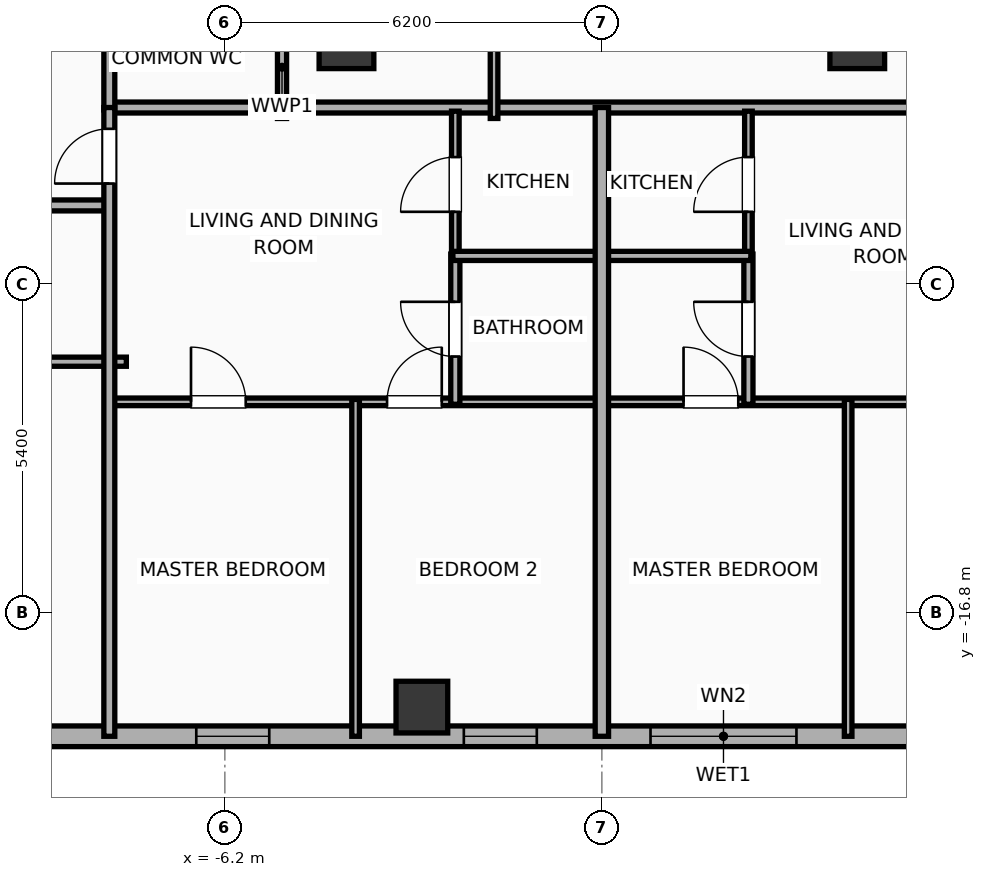
"""IFC4 building model, lengths in metres.
Left out: names, types, materials, properties, quantities, classifications, styles, units other than length and angle.
Written with IfcOpenShell. Run it as: python <this file> out.ifc"""

import sys

from ifc_helpers import new_model, si_unit, direction, frame, frame_2d, origin, origin_2d, place, context, subcontext, project, spatial, rectangle, hollow_rectangle, extrude, element, fill, save


model = new_model("IFC4")
c1 = context("Model", 3, precision=1e-05, world=origin(), true_north=direction((0.0, 1.0)))
c2 = subcontext(c1, "Body", "Model", "MODEL_VIEW")
j1 = project(units=[si_unit("LENGTHUNIT", "METRE"), si_unit("PLANEANGLEUNIT", "RADIAN")], contexts=[c1])
p1 = place(None, origin())
s1 = spatial("IfcSite", under=j1, at=p1, CompositionType="ELEMENT")
p2 = place(p1, origin())
s2 = spatial("IfcBuilding", under=s1, at=p2, CompositionType="ELEMENT")
p3 = place(p2, frame((0.0, 0.0, 235.3)))
s3 = spatial("IfcBuildingStorey", under=s2, at=p3, CompositionType="ELEMENT", Elevation=235.3)
for number, where, z_axis, x_axis in (
    (1, (-4.2, -7.4, 0.0), (0.0, 0.0, 1.0), (1.0, 0.0, 0.0)),
    (2, (4.2, -7.4, 0.0), (0.0, 0.0, 1.0), (1.0, 0.0, 0.0)),
):
    element("IfcColumn", number, at=place(p3, frame(where, z_axis=z_axis, x_axis=x_axis)), inside=s3, PredefinedType="COLUMN", context=c2, shape_type="SweptSolid", body=[
        extrude(rectangle(XDim=0.9, YDim=0.9, at=origin_2d()), origin(), (0.0, 0.0, 1.0), 3.9),
    ])
p4 = place(p3, frame((-2.96, -18.35, 0.0), z_axis=(0.0, 0.0, 1.0), x_axis=(1.0, 0.0, 0.0)))
e3 = element("IfcColumn", 3, at=p4, inside=s3, PredefinedType="COLUMN", context=c2, shape_type="SweptSolid", body=[
    extrude(hollow_rectangle(XDim=0.85, YDim=0.85, WallThickness=0.028, at=origin_2d()), origin(), (0.0, 0.0, 1.0), 3.9),
])
p5 = place(p3, frame((26.783, -18.83, 0.0), z_axis=(0.0, 0.0, 1.0), x_axis=(-1.0, 0.0, 0.0)))
e4 = element("IfcWall", 4, at=p5, inside=s3, PredefinedType="ELEMENTEDWALL", context=c2, shape_type="SweptSolid", body=[
    extrude(rectangle(XDim=49.566, YDim=0.34, at=frame_2d((24.783, 0.0))), origin(), (0.0, 0.0, 1.0), 3.65),
])
p6 = place(p5, frame((23.583, 0.0, 0.75)))
e5 = element("IfcOpeningElement", 5, at=p6, cuts=e4, PredefinedType="OPENING", context=c2, shape_type="SweptSolid", body=[
    extrude(rectangle(XDim=2.4, YDim=2.1, at=frame_2d((1.2, 1.05))), frame((0.0, 0.18, 0.0), z_axis=(0.0, -1.0, 0.0), x_axis=(1.0, 0.0, 0.0)), (0.0, 0.0, 1.0), 0.36),
])
p7 = place(p5, frame((41.756, 0.0, 0.75)))
e6 = element("IfcOpeningElement", 6, at=p7, cuts=e4, PredefinedType="OPENING", context=c2, shape_type="SweptSolid", body=[
    extrude(rectangle(XDim=2.4, YDim=2.1, at=frame_2d((1.2, 1.05))), frame((0.0, 0.18, 0.0), z_axis=(0.0, -1.0, 0.0), x_axis=(1.0, 0.0, 0.0)), (0.0, 0.0, 1.0), 0.36),
])
p8 = place(p5, frame((47.222, 0.0, 0.75)))
e7 = element("IfcOpeningElement", 7, at=p8, cuts=e4, PredefinedType="OPENING", context=c2, shape_type="SweptSolid", body=[
    extrude(rectangle(XDim=1.2, YDim=2.05, at=frame_2d((0.6, 1.025))), frame((0.0, 0.18, 0.0), z_axis=(0.0, -1.0, 0.0), x_axis=(1.0, 0.0, 0.0)), (0.0, 0.0, 1.0), 0.36),
])
p9 = place(p5, frame((45.181, 0.0, 0.75)))
e8 = element("IfcOpeningElement", 8, at=p9, cuts=e4, PredefinedType="OPENING", context=c2, shape_type="SweptSolid", body=[
    extrude(rectangle(XDim=1.2, YDim=2.05, at=frame_2d((0.6, 1.025))), frame((0.0, 0.18, 0.0), z_axis=(0.0, -1.0, 0.0), x_axis=(1.0, 0.0, 0.0)), (0.0, 0.0, 1.0), 0.36),
])
p10 = place(p5, frame((37.289, 0.0, 0.75)))
e9 = element("IfcOpeningElement", 9, at=p10, cuts=e4, PredefinedType="OPENING", context=c2, shape_type="SweptSolid", body=[
    extrude(rectangle(XDim=1.2, YDim=2.05, at=frame_2d((0.6, 1.025))), frame((0.0, 0.18, 0.0), z_axis=(0.0, -1.0, 0.0), x_axis=(1.0, 0.0, 0.0)), (0.0, 0.0, 1.0), 0.36),
])
p11 = place(p5, frame((15.715, 0.0, 0.75)))
e10 = element("IfcOpeningElement", 10, at=p11, cuts=e4, PredefinedType="OPENING", context=c2, shape_type="SweptSolid", body=[
    extrude(rectangle(XDim=1.2, YDim=2.05, at=frame_2d((0.6, 1.025))), frame((0.0, 0.18, 0.0), z_axis=(0.0, -1.0, 0.0), x_axis=(1.0, 0.0, 0.0)), (0.0, 0.0, 1.0), 0.36),
])
p12 = place(p5, frame((12.022, 0.0, 0.75)))
e11 = element("IfcOpeningElement", 11, at=p12, cuts=e4, PredefinedType="OPENING", context=c2, shape_type="SweptSolid", body=[
    extrude(rectangle(XDim=1.2, YDim=2.05, at=frame_2d((0.6, 1.025))), frame((0.0, 0.18, 0.0), z_axis=(0.0, -1.0, 0.0), x_axis=(1.0, 0.0, 0.0)), (0.0, 0.0, 1.0), 0.36),
])
p13 = place(p5, frame((8.01, 0.0, 0.75)))
e12 = element("IfcOpeningElement", 12, at=p13, cuts=e4, PredefinedType="OPENING", context=c2, shape_type="SweptSolid", body=[
    extrude(rectangle(XDim=1.2, YDim=2.05, at=frame_2d((0.6, 1.025))), frame((0.0, 0.18, 0.0), z_axis=(0.0, -1.0, 0.0), x_axis=(1.0, 0.0, 0.0)), (0.0, 0.0, 1.0), 0.36),
])
p14 = place(p5, frame((5.037, 0.0, 0.75)))
e13 = element("IfcOpeningElement", 13, at=p14, cuts=e4, PredefinedType="OPENING", context=c2, shape_type="SweptSolid", body=[
    extrude(rectangle(XDim=1.2, YDim=2.05, at=frame_2d((0.6, 1.025))), frame((0.0, 0.18, 0.0), z_axis=(0.0, -1.0, 0.0), x_axis=(1.0, 0.0, 0.0)), (0.0, 0.0, 1.0), 0.36),
])
p15 = place(p5, frame((1.811, 0.0, 0.75)))
e14 = element("IfcOpeningElement", 14, at=p15, cuts=e4, PredefinedType="OPENING", context=c2, shape_type="SweptSolid", body=[
    extrude(rectangle(XDim=1.2, YDim=2.05, at=frame_2d((0.6, 1.025))), frame((0.0, 0.18, 0.0), z_axis=(0.0, -1.0, 0.0), x_axis=(1.0, 0.0, 0.0)), (0.0, 0.0, 1.0), 0.36),
])
p16 = place(p5, frame((32.253, 0.0, 0.75)))
e15 = element("IfcOpeningElement", 15, at=p16, cuts=e4, PredefinedType="OPENING", context=c2, shape_type="SweptSolid", body=[
    extrude(rectangle(XDim=1.2, YDim=2.05, at=frame_2d((0.6, 1.025))), frame((0.0, 0.18, 0.0), z_axis=(0.0, -1.0, 0.0), x_axis=(1.0, 0.0, 0.0)), (0.0, 0.0, 1.0), 0.36),
])
p17 = place(p5, frame((27.853, 0.0, 0.75)))
e16 = element("IfcOpeningElement", 16, at=p17, cuts=e4, PredefinedType="OPENING", context=c2, shape_type="SweptSolid", body=[
    extrude(rectangle(XDim=1.2, YDim=2.05, at=frame_2d((0.6, 1.025))), frame((0.0, 0.18, 0.0), z_axis=(0.0, -1.0, 0.0), x_axis=(1.0, 0.0, 0.0)), (0.0, 0.0, 1.0), 0.36),
])
p18 = place(p5, frame((20.473, 0.0, 0.75)))
e17 = element("IfcOpeningElement", 17, at=p18, cuts=e4, PredefinedType="OPENING", context=c2, shape_type="SweptSolid", body=[
    extrude(rectangle(XDim=1.2, YDim=2.05, at=frame_2d((0.6, 1.025))), frame((0.0, 0.18, 0.0), z_axis=(0.0, -1.0, 0.0), x_axis=(1.0, 0.0, 0.0)), (0.0, 0.0, 1.0), 0.36),
])
p19 = place(p3, frame((-8.15, -8.49, 0.0), z_axis=(0.0, 0.0, 1.0), x_axis=(1.0, 0.0, 0.0)))
e18 = element("IfcWall", 18, at=p19, inside=s3, PredefinedType="PARTITIONING", context=c2, shape_type="SweptSolid", body=[
    extrude(rectangle(XDim=16.3, YDim=0.18, at=frame_2d((8.15, 0.0))), origin(), (0.0, 0.0, 1.0), 3.65),
])
p20 = place(p3, frame((-8.1, -8.53, 0.0), z_axis=(0.0, 0.0, 1.0), x_axis=(0.0, 1.0, 0.0)))
e19 = element("IfcWall", 19, at=p20, inside=s3, PredefinedType="PARTITIONING", context=c2, shape_type="SweptSolid", body=[
    extrude(rectangle(XDim=17.06, YDim=0.18, at=frame_2d((8.53, 0.0))), origin(), (0.0, 0.0, 1.0), 3.65),
])
p21 = place(p20, frame((1.206, 0.0, 0.0)))
e20 = element("IfcOpeningElement", 20, at=p21, cuts=e19, PredefinedType="OPENING", context=c2, shape_type="SweptSolid", body=[
    extrude(rectangle(XDim=1.0, YDim=2.05, at=frame_2d((0.5, 1.025))), frame((0.0, 0.1, 0.0), z_axis=(0.0, -1.0, 0.0), x_axis=(1.0, 0.0, 0.0)), (0.0, 0.0, 1.0), 0.2),
])
p22 = place(p20, frame((9.761, 0.0, 0.0)))
e21 = element("IfcOpeningElement", 21, at=p22, cuts=e19, PredefinedType="OPENING", context=c2, shape_type="SweptSolid", body=[
    extrude(rectangle(XDim=0.95, YDim=2.05, at=frame_2d((0.475, 1.025))), frame((0.0, 0.1, 0.0), z_axis=(0.0, -1.0, 0.0), x_axis=(1.0, 0.0, 0.0)), (0.0, 0.0, 1.0), 0.2),
])
p23 = place(p3, frame((-5.26, -8.67, 0.0), z_axis=(0.0, 0.0, 1.0), x_axis=(0.0, 1.0, 0.0)))
e22 = element("IfcWall", 22, at=p23, inside=s3, PredefinedType="PLUMBINGWALL", context=c2, shape_type="SweptSolid", body=[
    extrude(rectangle(XDim=3.35, YDim=0.15, at=frame_2d((1.675, 0.0))), origin(), (0.0, 0.0, 1.0), 3.65),
])
p24 = place(p23, frame((1.835, 0.0, 0.0)))
e23 = element("IfcOpeningElement", 23, at=p24, cuts=e22, PredefinedType="OPENING", context=c2, shape_type="SweptSolid", body=[
    extrude(rectangle(XDim=1.0, YDim=2.05, at=frame_2d((0.5, 1.025))), frame((0.0, 0.085, 0.0), z_axis=(0.0, -1.0, 0.0), x_axis=(1.0, 0.0, 0.0)), (0.0, 0.0, 1.0), 0.17),
])
p25 = place(p3, frame((-1.773, -8.67, 0.0), z_axis=(0.0, 0.0, 1.0), x_axis=(0.0, 1.0, 0.0)))
e24 = element("IfcWall", 24, at=p25, inside=s3, PredefinedType="PARTITIONING", context=c2, shape_type="SweptSolid", body=[
    extrude(rectangle(XDim=17.29, YDim=0.125, at=frame_2d((8.645, 0.0))), origin(), (0.0, 0.0, 1.0), 3.65),
])
p26 = place(p25, frame((8.17, 0.0, 0.0)))
e25 = element("IfcOpeningElement", 25, at=p26, cuts=e24, PredefinedType="OPENING", context=c2, shape_type="SweptSolid", body=[
    extrude(rectangle(XDim=0.95, YDim=2.05, at=frame_2d((0.475, 1.025))), frame((0.0, 0.073, 0.0), z_axis=(0.0, -1.0, 0.0), x_axis=(1.0, 0.0, 0.0)), (0.0, 0.0, 1.0), 0.145),
])
p27 = place(p3, frame((-10.217, -12.67, 0.0), z_axis=(0.0, 0.0, 1.0), x_axis=(1.0, 0.0, 0.0)))
e26 = element("IfcWall", 26, at=p27, inside=s3, PredefinedType="PLUMBINGWALL", context=c2, shape_type="SweptSolid", body=[
    extrude(rectangle(XDim=2.397, YDim=0.15, at=frame_2d((1.198, 0.0))), origin(), (0.0, 0.0, 1.0), 3.65),
])
p28 = place(p3, frame((-26.23, -10.1, 0.0), z_axis=(0.0, 0.0, 1.0), x_axis=(1.0, 0.0, 0.0)))
e27 = element("IfcWall", 27, at=p28, inside=s3, PredefinedType="PARTITIONING", context=c2, shape_type="SweptSolid", body=[
    extrude(rectangle(XDim=18.15, YDim=0.18, at=frame_2d((9.075, 0.0))), origin(), (0.0, 0.0, 1.0), 3.65),
])
p29 = place(p28, frame((2.659, 0.0, 0.0)))
e28 = element("IfcOpeningElement", 28, at=p29, cuts=e27, PredefinedType="OPENING", context=c2, shape_type="SweptSolid", body=[
    extrude(rectangle(XDim=0.9, YDim=2.05, at=frame_2d((0.45, 1.025))), frame((0.0, 0.1, 0.0), z_axis=(0.0, -1.0, 0.0), x_axis=(1.0, 0.0, 0.0)), (0.0, 0.0, 1.0), 0.2),
])
p30 = place(p28, frame((9.654, 0.0, 0.0)))
e29 = element("IfcOpeningElement", 29, at=p30, cuts=e27, PredefinedType="OPENING", context=c2, shape_type="SweptSolid", body=[
    extrude(rectangle(XDim=1.15, YDim=2.05, at=frame_2d((0.575, 1.025))), frame((0.0, 0.1, 0.0), z_axis=(0.0, -1.0, 0.0), x_axis=(1.0, 0.0, 0.0)), (0.0, 0.0, 1.0), 0.2),
])
p31 = place(p28, frame((14.792, 0.0, 0.0)))
e30 = element("IfcOpeningElement", 30, at=p31, cuts=e27, PredefinedType="OPENING", context=c2, shape_type="SweptSolid", body=[
    extrude(rectangle(XDim=0.9, YDim=2.05, at=frame_2d((0.45, 1.025))), frame((0.0, 0.1, 0.0), z_axis=(0.0, -1.0, 0.0), x_axis=(1.0, 0.0, 0.0)), (0.0, 0.0, 1.0), 0.2),
])
p32 = place(p3, frame((-8.08, -13.33, 0.0), z_axis=(0.0, 0.0, 1.0), x_axis=(1.0, 0.0, 0.0)))
e31 = element("IfcWall", 31, at=p32, inside=s3, PredefinedType="PARTITIONING", context=c2, shape_type="SweptSolid", body=[
    extrude(rectangle(XDim=8.06, YDim=0.125, at=frame_2d((4.03, 0.0))), origin(), (0.0, 0.0, 1.0), 3.65),
])
p33 = place(p32, frame((1.323, 0.0, 0.0)))
e32 = element("IfcOpeningElement", 32, at=p33, cuts=e31, PredefinedType="OPENING", context=c2, shape_type="SweptSolid", body=[
    extrude(rectangle(XDim=0.9, YDim=2.05, at=frame_2d((0.45, 1.025))), frame((0.0, 0.073, 0.0), z_axis=(0.0, -1.0, 0.0), x_axis=(1.0, 0.0, 0.0)), (0.0, 0.0, 1.0), 0.145),
])
p34 = place(p32, frame((4.547, 0.0, 0.0)))
e33 = element("IfcOpeningElement", 33, at=p34, cuts=e31, PredefinedType="OPENING", context=c2, shape_type="SweptSolid", body=[
    extrude(rectangle(XDim=0.9, YDim=2.05, at=frame_2d((0.45, 1.025))), frame((0.0, 0.073, 0.0), z_axis=(0.0, -1.0, 0.0), x_axis=(1.0, 0.0, 0.0)), (0.0, 0.0, 1.0), 0.145),
])
p35 = place(p3, frame((-2.41, -10.96, 0.0), z_axis=(0.0, 0.0, 1.0), x_axis=(0.0, 1.0, 0.0)))
e34 = element("IfcWall", 34, at=p35, inside=s3, PredefinedType="PARTITIONING", context=c2, shape_type="SweptSolid", body=[
    extrude(rectangle(XDim=2.41, YDim=0.125, at=frame_2d((1.205, 0.0))), origin(), (0.0, 0.0, 1.0), 3.65),
])
p36 = place(p35, frame((0.755, 0.0, 0.0)))
e35 = element("IfcOpeningElement", 35, at=p36, cuts=e34, PredefinedType="OPENING", context=c2, shape_type="SweptSolid", body=[
    extrude(rectangle(XDim=0.9, YDim=2.05, at=frame_2d((0.45, 1.025))), frame((0.0, 0.073, 0.0), z_axis=(0.0, -1.0, 0.0), x_axis=(1.0, 0.0, 0.0)), (0.0, 0.0, 1.0), 0.145),
])
p37 = place(p3, frame((-2.41, -13.37, 0.0), z_axis=(0.0, 0.0, 1.0), x_axis=(0.0, 1.0, 0.0)))
e36 = element("IfcWall", 36, at=p37, inside=s3, PredefinedType="PLUMBINGWALL", context=c2, shape_type="SweptSolid", body=[
    extrude(rectangle(XDim=2.47, YDim=0.15, at=frame_2d((1.235, 0.0))), origin(), (0.0, 0.0, 1.0), 3.65),
])
p38 = place(p37, frame((0.785, 0.0, 0.0)))
e37 = element("IfcOpeningElement", 37, at=p38, cuts=e36, PredefinedType="OPENING", context=c2, shape_type="SweptSolid", body=[
    extrude(rectangle(XDim=0.9, YDim=2.05, at=frame_2d((0.45, 1.025))), frame((0.0, 0.085, 0.0), z_axis=(0.0, -1.0, 0.0), x_axis=(1.0, 0.0, 0.0)), (0.0, 0.0, 1.0), 0.17),
])
p39 = place(p3, frame((-2.45, -10.93, 0.0), z_axis=(0.0, 0.0, 1.0), x_axis=(1.0, 0.0, 0.0)))
e38 = element("IfcWall", 38, at=p39, inside=s3, PredefinedType="PLUMBINGWALL", context=c2, shape_type="SweptSolid", body=[
    extrude(rectangle(XDim=2.43, YDim=0.15, at=frame_2d((1.215, 0.0))), origin(), (0.0, 0.0, 1.0), 3.65),
])
p40 = place(p3, frame((-4.05, -18.83, 0.0), z_axis=(0.0, 0.0, 1.0), x_axis=(0.0, 1.0, 0.0)))
e39 = element("IfcWall", 39, at=p40, inside=s3, PredefinedType="PARTITIONING", context=c2, shape_type="SweptSolid", body=[
    extrude(rectangle(XDim=5.54, YDim=0.125, at=frame_2d((2.77, 0.0))), origin(), (0.0, 0.0, 1.0), 3.65),
])
p41 = place(p3, frame((-8.1, -18.83, 0.0), z_axis=(0.0, 0.0, 1.0), x_axis=(0.0, 1.0, 0.0)))
e40 = element("IfcWall", 40, at=p41, inside=s3, PredefinedType="PARTITIONING", context=c2, shape_type="SweptSolid", body=[
    extrude(rectangle(XDim=10.34, YDim=0.18, at=frame_2d((5.17, 0.0))), origin(), (0.0, 0.0, 1.0), 3.65),
])
p42 = place(p41, frame((9.09, 0.0, 0.0)))
e41 = element("IfcOpeningElement", 41, at=p42, cuts=e40, PredefinedType="OPENING", context=c2, shape_type="SweptSolid", body=[
    extrude(rectangle(XDim=0.9, YDim=2.05, at=frame_2d((0.45, 1.025))), frame((0.0, 0.1, 0.0), z_axis=(0.0, -1.0, 0.0), x_axis=(1.0, 0.0, 0.0)), (0.0, 0.0, 1.0), 0.2),
])
p43 = place(p3, frame((0.02, -13.33, 0.0), z_axis=(0.0, 0.0, 1.0), x_axis=(1.0, 0.0, 0.0)))
e42 = element("IfcWall", 42, at=p43, inside=s3, PredefinedType="PARTITIONING", context=c2, shape_type="SweptSolid", body=[
    extrude(rectangle(XDim=8.06, YDim=0.125, at=frame_2d((4.03, 0.0))), origin(), (0.0, 0.0, 1.0), 3.65),
])
p44 = place(p43, frame((1.323, 0.0, 0.0)))
e43 = element("IfcOpeningElement", 43, at=p44, cuts=e42, PredefinedType="OPENING", context=c2, shape_type="SweptSolid", body=[
    extrude(rectangle(XDim=0.9, YDim=2.05, at=frame_2d((0.45, 1.025))), frame((0.0, 0.073, 0.0), z_axis=(0.0, -1.0, 0.0), x_axis=(1.0, 0.0, 0.0)), (0.0, 0.0, 1.0), 0.145),
])
p45 = place(p43, frame((5.837, 0.0, 0.0)))
e44 = element("IfcOpeningElement", 44, at=p45, cuts=e42, PredefinedType="OPENING", context=c2, shape_type="SweptSolid", body=[
    extrude(rectangle(XDim=0.9, YDim=2.05, at=frame_2d((0.45, 1.025))), frame((0.0, 0.073, 0.0), z_axis=(0.0, -1.0, 0.0), x_axis=(1.0, 0.0, 0.0)), (0.0, 0.0, 1.0), 0.145),
])
p46 = place(p3, frame((2.41, -10.96, 0.0), z_axis=(0.0, 0.0, 1.0), x_axis=(0.0, 1.0, 0.0)))
e45 = element("IfcWall", 45, at=p46, inside=s3, PredefinedType="PARTITIONING", context=c2, shape_type="SweptSolid", body=[
    extrude(rectangle(XDim=2.41, YDim=0.125, at=frame_2d((1.205, 0.0))), origin(), (0.0, 0.0, 1.0), 3.65),
])
p47 = place(p46, frame((0.755, 0.0, 0.0)))
e46 = element("IfcOpeningElement", 46, at=p47, cuts=e45, PredefinedType="OPENING", context=c2, shape_type="SweptSolid", body=[
    extrude(rectangle(XDim=0.9, YDim=2.05, at=frame_2d((0.45, 1.025))), frame((0.0, 0.073, 0.0), z_axis=(0.0, -1.0, 0.0), x_axis=(1.0, 0.0, 0.0)), (0.0, 0.0, 1.0), 0.145),
])
p48 = place(p3, frame((2.41, -13.37, 0.0), z_axis=(0.0, 0.0, 1.0), x_axis=(0.0, 1.0, 0.0)))
e47 = element("IfcWall", 47, at=p48, inside=s3, PredefinedType="PLUMBINGWALL", context=c2, shape_type="SweptSolid", body=[
    extrude(rectangle(XDim=2.47, YDim=0.15, at=frame_2d((1.235, 0.0))), origin(), (0.0, 0.0, 1.0), 3.65),
])
p49 = place(p48, frame((0.785, 0.0, 0.0)))
e48 = element("IfcOpeningElement", 48, at=p49, cuts=e47, PredefinedType="OPENING", context=c2, shape_type="SweptSolid", body=[
    extrude(rectangle(XDim=0.9, YDim=2.05, at=frame_2d((0.45, 1.025))), frame((0.0, 0.085, 0.0), z_axis=(0.0, -1.0, 0.0), x_axis=(1.0, 0.0, 0.0)), (0.0, 0.0, 1.0), 0.17),
])
p50 = place(p3, frame((0.02, -10.93, 0.0), z_axis=(0.0, 0.0, 1.0), x_axis=(1.0, 0.0, 0.0)))
e49 = element("IfcWall", 49, at=p50, inside=s3, PredefinedType="PLUMBINGWALL", context=c2, shape_type="SweptSolid", body=[
    extrude(rectangle(XDim=2.43, YDim=0.15, at=frame_2d((1.215, 0.0))), origin(), (0.0, 0.0, 1.0), 3.65),
])
p51 = place(p3, frame((4.05, -18.83, 0.0), z_axis=(0.0, 0.0, 1.0), x_axis=(0.0, 1.0, 0.0)))
e50 = element("IfcWall", 50, at=p51, inside=s3, PredefinedType="PARTITIONING", context=c2, shape_type="SweptSolid", body=[
    extrude(rectangle(XDim=5.54, YDim=0.125, at=frame_2d((2.77, 0.0))), origin(), (0.0, 0.0, 1.0), 3.65),
])
p52 = place(p3, frame((0.0, -18.83, 0.0), z_axis=(0.0, 0.0, 1.0), x_axis=(0.0, 1.0, 0.0)))
e51 = element("IfcWall", 51, at=p52, inside=s3, PredefinedType="PARTITIONING", context=c2, shape_type="SweptSolid", body=[
    extrude(rectangle(XDim=10.34, YDim=0.22, at=frame_2d((5.17, 0.0))), origin(), (0.0, 0.0, 1.0), 3.65),
])
p53 = place(p6, origin())
e52 = element("IfcWindow", 52, at=p53, inside=s3, PartitioningType="SINGLE_PANEL", PredefinedType="WINDOW", context=c2, shape_type="SweptSolid", body=[
    extrude(rectangle(XDim=2.4, YDim=2.1, at=frame_2d((1.2, 1.05))), frame((0.0, 0.03, 0.0), z_axis=(0.0, -1.0, 0.0), x_axis=(1.0, 0.0, 0.0)), (0.0, 0.0, 1.0), 0.06),
])
fill(e5, e52)
p54 = place(p16, origin())
e53 = element("IfcWindow", 53, at=p54, inside=s3, PartitioningType="SINGLE_PANEL", PredefinedType="WINDOW", context=c2, shape_type="SweptSolid", body=[
    extrude(rectangle(XDim=1.2, YDim=2.05, at=frame_2d((0.6, 1.025))), frame((0.0, 0.03, 0.0), z_axis=(0.0, -1.0, 0.0), x_axis=(1.0, 0.0, 0.0)), (0.0, 0.0, 1.0), 0.06),
])
fill(e15, e53)
p55 = place(p17, origin())
e54 = element("IfcWindow", 54, at=p55, inside=s3, PartitioningType="SINGLE_PANEL", PredefinedType="WINDOW", context=c2, shape_type="SweptSolid", body=[
    extrude(rectangle(XDim=1.2, YDim=2.05, at=frame_2d((0.6, 1.025))), frame((0.0, 0.03, 0.0), z_axis=(0.0, -1.0, 0.0), x_axis=(1.0, 0.0, 0.0)), (0.0, 0.0, 1.0), 0.06),
])
fill(e16, e54)
p56 = place(p33, origin())
e55 = element("IfcDoor", 55, at=p56, inside=s3, OperationType="SINGLE_SWING_LEFT", PredefinedType="DOOR", context=c2, shape_type="SweptSolid", body=[
    extrude(rectangle(XDim=0.9, YDim=2.05, at=frame_2d((0.45, 1.025))), frame((0.0, 0.025, 0.0), z_axis=(0.0, -1.0, 0.0), x_axis=(1.0, 0.0, 0.0)), (0.0, 0.0, 1.0), 0.05),
])
fill(e32, e55)
p57 = place(p34, origin())
e56 = element("IfcDoor", 56, at=p57, inside=s3, OperationType="SINGLE_SWING_RIGHT", PredefinedType="DOOR", context=c2, shape_type="SweptSolid", body=[
    extrude(rectangle(XDim=0.9, YDim=2.05, at=frame_2d((0.45, 1.025))), frame((0.0, 0.025, 0.0), z_axis=(0.0, -1.0, 0.0), x_axis=(1.0, 0.0, 0.0)), (0.0, 0.0, 1.0), 0.05),
])
fill(e33, e56)
p58 = place(p36, origin())
e57 = element("IfcDoor", 57, at=p58, inside=s3, OperationType="SINGLE_SWING_LEFT", PredefinedType="DOOR", context=c2, shape_type="SweptSolid", body=[
    extrude(rectangle(XDim=0.9, YDim=2.05, at=frame_2d((0.45, 1.025))), frame((0.0, 0.025, 0.0), z_axis=(0.0, -1.0, 0.0), x_axis=(1.0, 0.0, 0.0)), (0.0, 0.0, 1.0), 0.05),
])
fill(e35, e57)
p59 = place(p38, origin())
e58 = element("IfcDoor", 58, at=p59, inside=s3, OperationType="SINGLE_SWING_RIGHT", PredefinedType="DOOR", context=c2, shape_type="SweptSolid", body=[
    extrude(rectangle(XDim=0.9, YDim=2.05, at=frame_2d((0.45, 1.025))), frame((0.0, 0.025, 0.0), z_axis=(0.0, -1.0, 0.0), x_axis=(1.0, 0.0, 0.0)), (0.0, 0.0, 1.0), 0.05),
])
fill(e37, e58)
p60 = place(p42, origin())
e59 = element("IfcDoor", 59, at=p60, inside=s3, OperationType="SINGLE_SWING_LEFT", PredefinedType="DOOR", context=c2, shape_type="SweptSolid", body=[
    extrude(rectangle(XDim=0.9, YDim=2.05, at=frame_2d((0.45, 1.025))), frame((0.0, 0.025, 0.0), z_axis=(0.0, -1.0, 0.0), x_axis=(1.0, 0.0, 0.0)), (0.0, 0.0, 1.0), 0.05),
])
fill(e41, e59)
p61 = place(p44, origin())
e60 = element("IfcDoor", 60, at=p61, inside=s3, OperationType="SINGLE_SWING_LEFT", PredefinedType="DOOR", context=c2, shape_type="SweptSolid", body=[
    extrude(rectangle(XDim=0.9, YDim=2.05, at=frame_2d((0.45, 1.025))), frame((0.0, 0.025, 0.0), z_axis=(0.0, -1.0, 0.0), x_axis=(1.0, 0.0, 0.0)), (0.0, 0.0, 1.0), 0.05),
])
fill(e43, e60)
p62 = place(p47, origin())
e61 = element("IfcDoor", 61, at=p62, inside=s3, OperationType="SINGLE_SWING_LEFT", PredefinedType="DOOR", context=c2, shape_type="SweptSolid", body=[
    extrude(rectangle(XDim=0.9, YDim=2.05, at=frame_2d((0.45, 1.025))), frame((0.0, 0.025, 0.0), z_axis=(0.0, -1.0, 0.0), x_axis=(1.0, 0.0, 0.0)), (0.0, 0.0, 1.0), 0.05),
])
fill(e46, e61)
p63 = place(p49, origin())
e62 = element("IfcDoor", 62, at=p63, inside=s3, OperationType="SINGLE_SWING_RIGHT", PredefinedType="DOOR", context=c2, shape_type="SweptSolid", body=[
    extrude(rectangle(XDim=0.9, YDim=2.05, at=frame_2d((0.45, 1.025))), frame((0.0, 0.025, 0.0), z_axis=(0.0, -1.0, 0.0), x_axis=(1.0, 0.0, 0.0)), (0.0, 0.0, 1.0), 0.05),
])
fill(e48, e62)
save(model, sys.argv[1])
